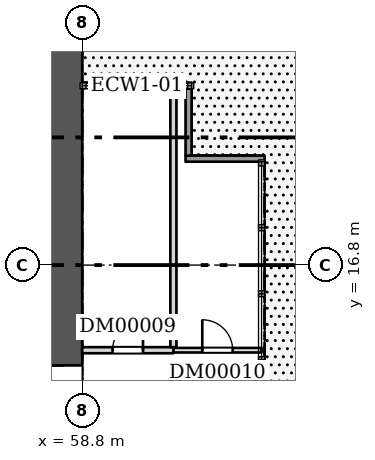
"""IFC4 building model, lengths in metres.
Left out: names, types, materials, properties, quantities, classifications, styles, units other than length and angle.
Written with IfcOpenShell. Run it as: python <this file> out.ifc"""

import sys

from ifc_helpers import new_model, si_unit, direction, frame, frame_2d, origin, place, context, subcontext, project, spatial, rectangle, extrude, element, fill, save


model = new_model("IFC4")
c1 = context("Model", 3, precision=1e-05, world=origin(), true_north=direction((0.0, 1.0)))
c2 = subcontext(c1, "Body", "Model", "MODEL_VIEW")
j1 = project(units=[si_unit("LENGTHUNIT", "METRE"), si_unit("PLANEANGLEUNIT", "RADIAN")], contexts=[c1])
p1 = place(None, origin())
s1 = spatial("IfcSite", under=j1, at=p1, CompositionType="ELEMENT")
p2 = place(p1, origin())
s2 = spatial("IfcBuilding", under=s1, at=p2, CompositionType="ELEMENT")
p3 = place(p2, origin())
s3 = spatial("IfcBuildingStorey", under=s2, at=p3, CompositionType="ELEMENT", Elevation=0.0)
p4 = place(p3, frame((58.2, 9.6, 0.0), z_axis=(0.0, 0.0, 1.0), x_axis=(0.0, 1.0, 0.0)))
e1 = element("IfcWall", 1, at=p4, inside=s3, PredefinedType="SHEAR", context=c2, shape_type="SweptSolid", body=[
    extrude(rectangle(XDim=14.4, YDim=1.2, at=frame_2d((7.2, 0.0))), origin(), (0.0, 0.0, 1.0), 8.7),
])
p5 = place(p4, frame((2.1, 0.0, 0.0)))
e2 = element("IfcOpeningElement", 2, at=p5, cuts=e1, PredefinedType="OPENING", context=c2, shape_type="SweptSolid", body=[
    extrude(rectangle(XDim=1.8, YDim=2.1, at=frame_2d((0.9, 1.05))), frame((0.0, 0.61, 0.0), z_axis=(0.0, -1.0, 0.0), x_axis=(1.0, 0.0, 0.0)), (0.0, 0.0, 1.0), 1.22),
])
p6 = place(p3, frame((58.8, 14.0, 0.0), z_axis=(0.0, 0.0, 1.0), x_axis=(1.0, 0.0, 0.0)))
e3 = element("IfcWall", 3, at=p6, inside=s3, PredefinedType="PARTITIONING", context=c2, shape_type="SweptSolid", body=[
    extrude(rectangle(XDim=3.0, YDim=0.2, at=frame_2d((1.5, 0.0))), origin(), (0.0, 0.0, 1.0), 8.7),
])
p7 = place(p6, frame((1.0, 0.0, 0.0)))
e4 = element("IfcOpeningElement", 4, at=p7, cuts=e3, PredefinedType="OPENING", context=c2, shape_type="SweptSolid", body=[
    extrude(rectangle(XDim=1.0, YDim=2.1, at=frame_2d((0.5, 1.05))), frame((0.0, 0.11, 0.0), z_axis=(0.0, -1.0, 0.0), x_axis=(1.0, 0.0, 0.0)), (0.0, 0.0, 1.0), 0.22),
])
p8 = place(p3, frame((61.8, 14.1, 0.0), z_axis=(0.0, 0.0, 1.0), x_axis=(0.0, 1.0, 0.0)))
e5 = element("IfcWall", 5, at=p8, inside=s3, PredefinedType="PARTITIONING", context=c2, shape_type="SweptSolid", body=[
    extrude(rectangle(XDim=8.6, YDim=0.2, at=frame_2d((4.3, 0.0))), origin(), (0.0, 0.0, 1.0), 8.7),
])
p9 = place(p3, frame((61.8, 14.0, 0.0), z_axis=(0.0, 0.0, 1.0), x_axis=(1.0, 0.0, 0.0)))
e6 = element("IfcWall", 6, at=p9, inside=s3, PredefinedType="PARTITIONING", context=c2, shape_type="SweptSolid", body=[
    extrude(rectangle(XDim=2.9, YDim=0.15, at=frame_2d((1.45, 0.0))), origin(), (0.0, 0.0, 1.0), 8.7),
])
p10 = place(p9, frame((0.95, 0.0, 0.0)))
e7 = element("IfcOpeningElement", 7, at=p10, cuts=e6, PredefinedType="OPENING", context=c2, shape_type="SweptSolid", body=[
    extrude(rectangle(XDim=1.0, YDim=2.1, at=frame_2d((0.5, 1.05))), frame((0.0, 0.085, 0.0), z_axis=(0.0, -1.0, 0.0), x_axis=(1.0, 0.0, 0.0)), (0.0, 0.0, 1.0), 0.17),
])
p11 = place(p3, frame((64.8, 20.3, 0.0), z_axis=(0.0, 0.0, 1.0), x_axis=(-1.0, 0.0, 0.0)))
e8 = element("IfcWall", 8, at=p11, inside=s3, PredefinedType="SOLIDWALL", context=c2, shape_type="SweptSolid", body=[
    extrude(rectangle(XDim=2.6, YDim=0.2, at=frame_2d((1.3, 0.0))), origin(), (0.0, 0.0, 1.0), 8.7),
])
p12 = place(p3, frame((62.3, 20.4, 0.0), z_axis=(0.0, 0.0, 1.0), x_axis=(0.0, 1.0, 0.0)))
e9 = element("IfcWall", 9, at=p12, inside=s3, PredefinedType="SOLIDWALL", context=c2, shape_type="SweptSolid", body=[
    extrude(rectangle(XDim=2.2, YDim=0.2, at=frame_2d((1.1, 0.0))), origin(), (0.0, 0.0, 1.0), 8.7),
])
p13 = place(p5, origin())
e10 = element("IfcDoor", 10, at=p13, inside=s3, OperationType="DOUBLE_DOOR_SINGLE_SWING", PredefinedType="DOOR", context=c2, shape_type="SweptSolid", body=[
    extrude(rectangle(XDim=1.8, YDim=2.1, at=frame_2d((0.9, 1.05))), frame((0.0, 0.025, 0.0), z_axis=(0.0, -1.0, 0.0), x_axis=(1.0, 0.0, 0.0)), (0.0, 0.0, 1.0), 0.05),
])
fill(e2, e10)
p14 = place(p7, origin())
e11 = element("IfcDoor", 11, at=p14, inside=s3, OperationType="SINGLE_SWING_RIGHT", PredefinedType="DOOR", context=c2, shape_type="SweptSolid", body=[
    extrude(rectangle(XDim=1.0, YDim=2.1, at=frame_2d((0.5, 1.05))), frame((0.0, 0.025, 0.0), z_axis=(0.0, -1.0, 0.0), x_axis=(1.0, 0.0, 0.0)), (0.0, 0.0, 1.0), 0.05),
])
fill(e4, e11)
p15 = place(p10, origin())
e12 = element("IfcDoor", 12, at=p15, inside=s3, OperationType="SINGLE_SWING_LEFT", PredefinedType="DOOR", context=c2, shape_type="SweptSolid", body=[
    extrude(rectangle(XDim=1.0, YDim=2.1, at=frame_2d((0.5, 1.05))), frame((0.0, 0.025, 0.0), z_axis=(0.0, -1.0, 0.0), x_axis=(1.0, 0.0, 0.0)), (0.0, 0.0, 1.0), 0.05),
])
fill(e7, e12)
save(model, sys.argv[1])
